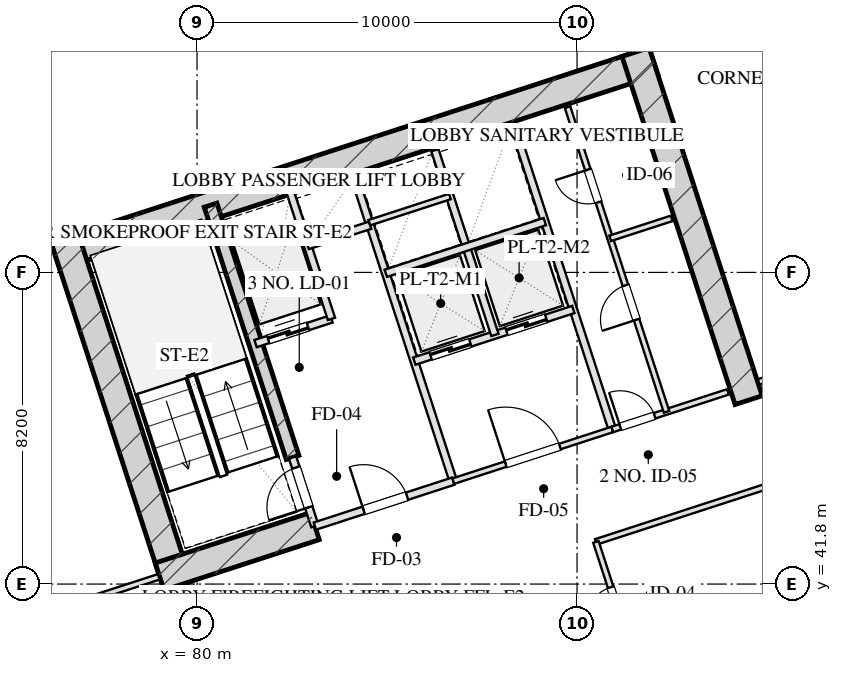
"""IFC4 building model, lengths in metres.
Left out: names, types, materials, properties, quantities, classifications, styles, units other than length and angle.
Written with IfcOpenShell. Run it as: python <this file> out.ifc"""

import sys

from ifc_helpers import new_model, si_unit, direction, frame, frame_2d, origin, place, context, subcontext, project, spatial, rectangle, extrude, element, fill, save


model = new_model("IFC4")
c1 = context("Model", 3, precision=1e-05, world=origin(), true_north=direction((0.0, 1.0)))
c2 = subcontext(c1, "Body", "Model", "MODEL_VIEW")
j1 = project(units=[si_unit("LENGTHUNIT", "METRE"), si_unit("PLANEANGLEUNIT", "RADIAN")], contexts=[c1])
p1 = place(None, origin())
s1 = spatial("IfcSite", under=j1, at=p1, CompositionType="ELEMENT")
p2 = place(p1, origin())
s2 = spatial("IfcBuilding", under=s1, at=p2, CompositionType="ELEMENT")
p3 = place(p2, frame((0.0, 0.0, 71.3)))
s3 = spatial("IfcBuildingStorey", under=s2, at=p3, CompositionType="ELEMENT", Elevation=71.3)
p4 = place(p3, frame((76.272, 50.443, 0.0), z_axis=(0.0, 0.0, 1.0), x_axis=(0.951056072937, 0.309018358888, 0.0)))
e1 = element("IfcWall", 1, at=p4, inside=s3, PredefinedType="SHEAR", context=c2, shape_type="SweptSolid", body=[
    extrude(rectangle(XDim=16.55, YDim=0.75, at=frame_2d((8.275, 0.0))), origin(), (0.0, 0.0, 1.0), 3.45),
])
for number, where, z_axis, x_axis in (
    (2, (79.489, 41.756, 0.0), (0.0, 0.0, 1.0), (-0.309, 0.951, 0.0)),
    (3, (94.515, 46.639, 0.0), (0.0, 0.0, 1.0), (-0.309, 0.951, 0.0)),
):
    element("IfcWall", number, at=place(p3, frame(where, z_axis=z_axis, x_axis=x_axis)), inside=s3, PredefinedType="SHEAR", context=c2, shape_type="SweptSolid", body=[
        extrude(rectangle(XDim=9.63, YDim=0.75, at=frame_2d((4.815, 0.0))), origin(), (0.0, 0.0, 1.0), 3.45),
    ])
p5 = place(p3, frame((82.514, 45.131, 0.0), z_axis=(0.0, 0.0, 1.0), x_axis=(-0.308988790936, 0.951065679686, 0.0)))
e4 = element("IfcWall", 4, at=p5, inside=s3, PredefinedType="SHEAR", context=c2, shape_type="SweptSolid", body=[
    extrude(rectangle(XDim=6.98, YDim=0.35, at=frame_2d((3.49, 0.0))), origin(), (0.0, 0.0, 1.0), 3.45),
])
p6 = place(p3, frame((79.016, 41.997, 0.0), z_axis=(0.0, 0.0, 1.0), x_axis=(0.95106038264, 0.309005094736, 0.0)))
e5 = element("IfcWall", 5, at=p6, inside=s3, PredefinedType="SHEAR", context=c2, shape_type="SweptSolid", body=[
    extrude(rectangle(XDim=4.295, YDim=0.75, at=frame_2d((2.147, 0.0))), origin(), (0.0, 0.0, 1.0), 3.45),
])
p7 = place(p3, frame((79.655, 4.352, 0.0), z_axis=(0.0, 0.0, 1.0), x_axis=(-0.309014526607, 0.951057318118, 0.0)))
e6 = element("IfcWall", 6, at=p7, inside=s3, PredefinedType="SOLIDWALL", context=c2, shape_type="SweptSolid", body=[
    extrude(rectangle(XDim=50.0, YDim=0.4, at=frame_2d((25.0, 0.0))), origin(), (0.0, 0.0, 1.0), 2.61),
])
p8 = place(p7, frame((17.35, 0.0, 0.75)))
e7 = element("IfcOpeningElement", 7, at=p8, cuts=e6, PredefinedType="OPENING", context=c2, shape_type="SweptSolid", body=[
    extrude(rectangle(XDim=2.5, YDim=1.46, at=frame_2d((1.25, 0.73))), frame((0.0, 0.21, 0.0), z_axis=(0.0, -1.0, 0.0), x_axis=(1.0, 0.0, 0.0)), (0.0, 0.0, 1.0), 0.42),
])
p9 = place(p7, frame((30.25, 0.0, 0.0)))
e8 = element("IfcOpeningElement", 8, at=p9, cuts=e6, PredefinedType="OPENING", context=c2, shape_type="SweptSolid", body=[
    extrude(rectangle(XDim=1.1, YDim=2.15, at=frame_2d((0.55, 1.075))), frame((0.0, 0.21, 0.0), z_axis=(0.0, -1.0, 0.0), x_axis=(1.0, 0.0, 0.0)), (0.0, 0.0, 1.0), 0.42),
])
p10 = place(p3, frame((66.002, 55.433, 0.0), z_axis=(0.0, 0.0, 1.0), x_axis=(0.951055939317, 0.309018770125, 0.0)))
e9 = element("IfcWall", 9, at=p10, inside=s3, PredefinedType="SOLIDWALL", context=c2, shape_type="SweptSolid", body=[
    extrude(rectangle(XDim=32.4, YDim=0.4, at=frame_2d((16.2, 0.0))), origin(), (0.0, 0.0, 1.0), 2.61),
])
p11 = place(p3, frame((83.101, 43.324, 0.0), z_axis=(0.0, 0.0, 1.0), x_axis=(-0.309048298632, 0.951046344356, 0.0)))
e10 = element("IfcWall", 10, at=p11, inside=s3, PredefinedType="PARTITIONING", context=c2, shape_type="SweptSolid", body=[
    extrude(rectangle(XDim=1.9, YDim=0.2, at=frame_2d((0.95, 0.0))), origin(), (0.0, 0.0, 1.0), 3.175),
])
p12 = place(p11, frame((0.52, 0.0, 0.0)))
e11 = element("IfcOpeningElement", 11, at=p12, cuts=e10, PredefinedType="OPENING", context=c2, shape_type="SweptSolid", body=[
    extrude(rectangle(XDim=1.1, YDim=2.05, at=frame_2d((0.55, 1.025))), frame((0.0, 0.11, 0.0), z_axis=(0.0, -1.0, 0.0), x_axis=(1.0, 0.0, 0.0)), (0.0, 0.0, 1.0), 0.22),
])
p13 = place(p3, frame((86.743, 44.508, 0.0), z_axis=(0.0, 0.0, 1.0), x_axis=(-0.309016001439, 0.951056838919, 0.0)))
e12 = element("IfcWall", 12, at=p13, inside=s3, PredefinedType="PARTITIONING", context=c2, shape_type="SweptSolid", body=[
    extrude(rectangle(XDim=8.43, YDim=0.2, at=frame_2d((4.215, 0.0))), origin(), (0.0, 0.0, 1.0), 3.175),
])
p14 = place(p3, frame((83.101, 43.324, 0.0), z_axis=(0.0, 0.0, 1.0), x_axis=(0.951052804469, 0.309028417967, 0.0)))
e13 = element("IfcWall", 13, at=p14, inside=s3, PredefinedType="PARTITIONING", context=c2, shape_type="SweptSolid", body=[
    extrude(rectangle(XDim=3.83, YDim=0.2, at=frame_2d((1.915, 0.0))), origin(), (0.0, 0.0, 1.0), 3.175),
])
p15 = place(p14, frame((1.35, 0.0, 0.0)))
e14 = element("IfcOpeningElement", 14, at=p15, cuts=e13, PredefinedType="OPENING", context=c2, shape_type="SweptSolid", body=[
    extrude(rectangle(XDim=1.2, YDim=2.05, at=frame_2d((0.6, 1.025))), frame((0.0, 0.11, 0.0), z_axis=(0.0, -1.0, 0.0), x_axis=(1.0, 0.0, 0.0)), (0.0, 0.0, 1.0), 0.22),
])
p16 = place(p3, frame((81.54, 48.127, 0.0), z_axis=(0.0, 0.0, 1.0), x_axis=(0.951062257173, 0.308999325213, 0.0)))
e15 = element("IfcWall", 15, at=p16, inside=s3, PredefinedType="PARTITIONING", context=c2, shape_type="SweptSolid", body=[
    extrude(rectangle(XDim=2.1, YDim=0.2, at=frame_2d((1.05, 0.0))), origin(), (0.0, 0.0, 1.0), 3.175),
])
p17 = place(p16, frame((0.35, 0.0, 0.0)))
e16 = element("IfcOpeningElement", 16, at=p17, cuts=e15, PredefinedType="OPENING", context=c2, shape_type="SweptSolid", body=[
    extrude(rectangle(XDim=1.1, YDim=2.05, at=frame_2d((0.55, 1.025))), frame((0.0, 0.11, 0.0), z_axis=(0.0, -1.0, 0.0), x_axis=(1.0, 0.0, 0.0)), (0.0, 0.0, 1.0), 0.22),
])
p18 = place(p3, frame((83.538, 48.776, 0.0), z_axis=(0.0, 0.0, 1.0), x_axis=(-0.3089935693, 0.951064127245, 0.0)))
e17 = element("IfcWall", 17, at=p18, inside=s3, PredefinedType="PARTITIONING", context=c2, shape_type="SweptSolid", body=[
    extrude(rectangle(XDim=3.7, YDim=0.2, at=frame_2d((1.85, 0.0))), origin(), (0.0, 0.0, 1.0), 3.175),
])
p19 = place(p3, frame((82.91, 50.707, 0.0), z_axis=(0.0, 0.0, 1.0), x_axis=(0.951041328149, 0.309063734775, 0.0)))
e18 = element("IfcWall", 18, at=p19, inside=s3, PredefinedType="PARTITIONING", context=c2, shape_type="SweptSolid", body=[
    extrude(rectangle(XDim=1.73, YDim=0.2, at=frame_2d((0.865, 0.0))), origin(), (0.0, 0.0, 1.0), 3.175),
])
p20 = place(p3, frame((90.928, 45.868, 0.0), z_axis=(0.0, 0.0, 1.0), x_axis=(-0.309042196757, 0.951048327176, 0.0)))
e19 = element("IfcWall", 19, at=p20, inside=s3, PredefinedType="PARTITIONING", context=c2, shape_type="SweptSolid", body=[
    extrude(rectangle(XDim=8.43, YDim=0.2, at=frame_2d((4.215, 0.0))), origin(), (0.0, 0.0, 1.0), 3.175),
])
p21 = place(p3, frame((86.743, 44.508, 0.0), z_axis=(0.0, 0.0, 1.0), x_axis=(0.951063829732, 0.308994485023, 0.0)))
e20 = element("IfcWall", 20, at=p21, inside=s3, PredefinedType="PARTITIONING", context=c2, shape_type="SweptSolid", body=[
    extrude(rectangle(XDim=4.4, YDim=0.15, at=frame_2d((2.2, 0.0))), origin(), (0.0, 0.0, 1.0), 3.175),
])
p22 = place(p21, frame((1.45, 0.0, 0.0)))
e21 = element("IfcOpeningElement", 21, at=p22, cuts=e20, PredefinedType="OPENING", context=c2, shape_type="SweptSolid", body=[
    extrude(rectangle(XDim=1.5, YDim=2.05, at=frame_2d((0.75, 1.025))), frame((0.0, 0.085, 0.0), z_axis=(0.0, -1.0, 0.0), x_axis=(1.0, 0.0, 0.0)), (0.0, 0.0, 1.0), 0.17),
])
p23 = place(p3, frame((85.718, 47.666, 0.0), z_axis=(0.0, 0.0, 1.0), x_axis=(0.951058531764, 0.30901079133, 0.0)))
e22 = element("IfcWall", 22, at=p23, inside=s3, PredefinedType="PARTITIONING", context=c2, shape_type="SweptSolid", body=[
    extrude(rectangle(XDim=4.4, YDim=0.2, at=frame_2d((2.2, 0.0))), origin(), (0.0, 0.0, 1.0), 3.175),
])
p24 = place(p23, frame((0.45, 0.0, 0.0)))
e23 = element("IfcOpeningElement", 23, at=p24, cuts=e22, PredefinedType="OPENING", context=c2, shape_type="SweptSolid", body=[
    extrude(rectangle(XDim=1.1, YDim=2.05, at=frame_2d((0.55, 1.025))), frame((0.0, 0.11, 0.0), z_axis=(0.0, -1.0, 0.0), x_axis=(1.0, 0.0, 0.0)), (0.0, 0.0, 1.0), 0.22),
])
p25 = place(p23, frame((2.55, 0.0, 0.0)))
e24 = element("IfcOpeningElement", 24, at=p25, cuts=e22, PredefinedType="OPENING", context=c2, shape_type="SweptSolid", body=[
    extrude(rectangle(XDim=1.1, YDim=2.05, at=frame_2d((0.55, 1.025))), frame((0.0, 0.11, 0.0), z_axis=(0.0, -1.0, 0.0), x_axis=(1.0, 0.0, 0.0)), (0.0, 0.0, 1.0), 0.22),
])
p26 = place(p3, frame((87.838, 48.354, 0.0), z_axis=(0.0, 0.0, 1.0), x_axis=(-0.3090093719, 0.951058992953, 0.0)))
e25 = element("IfcWall", 25, at=p26, inside=s3, PredefinedType="PARTITIONING", context=c2, shape_type="SweptSolid", body=[
    extrude(rectangle(XDim=5.11, YDim=0.2, at=frame_2d((2.555, 0.0))), origin(), (0.0, 0.0, 1.0), 3.175),
])
p27 = place(p3, frame((84.967, 49.977, 0.0), z_axis=(0.0, 0.0, 1.0), x_axis=(0.951063829732, 0.308994485023, 0.0)))
e26 = element("IfcWall", 26, at=p27, inside=s3, PredefinedType="PARTITIONING", context=c2, shape_type="SweptSolid", body=[
    extrude(rectangle(XDim=4.4, YDim=0.2, at=frame_2d((2.2, 0.0))), origin(), (0.0, 0.0, 1.0), 3.175),
])
p28 = place(p3, frame((84.534, 51.308, 0.0), z_axis=(0.0, 0.0, 1.0), x_axis=(0.951075093106, 0.308959814982, 0.0)))
e27 = element("IfcWall", 27, at=p28, inside=s3, PredefinedType="PARTITIONING", context=c2, shape_type="SweptSolid", body=[
    extrude(rectangle(XDim=2.23, YDim=0.15, at=frame_2d((1.115, 0.0))), origin(), (0.0, 0.0, 1.0), 3.175),
])
p29 = place(p3, frame((90.928, 45.868, 0.0), z_axis=(0.0, 0.0, 1.0), x_axis=(0.951059297078, 0.309008435874, 0.0)))
e28 = element("IfcWall", 28, at=p29, inside=s3, PredefinedType="PARTITIONING", context=c2, shape_type="SweptSolid", body=[
    extrude(rectangle(XDim=3.2, YDim=0.15, at=frame_2d((1.6, 0.0))), origin(), (0.0, 0.0, 1.0), 3.175),
])
p30 = place(p29, frame((0.22, 0.0, 0.0)))
e29 = element("IfcOpeningElement", 29, at=p30, cuts=e28, PredefinedType="OPENING", context=c2, shape_type="SweptSolid", body=[
    extrude(rectangle(XDim=0.95, YDim=2.05, at=frame_2d((0.475, 1.025))), frame((0.0, 0.085, 0.0), z_axis=(0.0, -1.0, 0.0), x_axis=(1.0, 0.0, 0.0)), (0.0, 0.0, 1.0), 0.17),
])
p31 = place(p3, frame((92.355, 46.331, 0.0), z_axis=(0.0, 0.0, 1.0), x_axis=(-0.309007490203, 0.951059604335, 0.0)))
e30 = element("IfcWall", 30, at=p31, inside=s3, PredefinedType="PARTITIONING", context=c2, shape_type="SweptSolid", body=[
    extrude(rectangle(XDim=8.43, YDim=0.15, at=frame_2d((4.215, 0.0))), origin(), (0.0, 0.0, 1.0), 3.175),
])
p32 = place(p31, frame((2.55, 0.0, 0.0)))
e31 = element("IfcOpeningElement", 31, at=p32, cuts=e30, PredefinedType="OPENING", context=c2, shape_type="SweptSolid", body=[
    extrude(rectangle(XDim=0.95, YDim=2.05, at=frame_2d((0.475, 1.025))), frame((0.0, 0.085, 0.0), z_axis=(0.0, -1.0, 0.0), x_axis=(1.0, 0.0, 0.0)), (0.0, 0.0, 1.0), 0.17),
])
p33 = place(p31, frame((5.8, 0.0, 0.0)))
e32 = element("IfcOpeningElement", 32, at=p33, cuts=e30, PredefinedType="OPENING", context=c2, shape_type="SweptSolid", body=[
    extrude(rectangle(XDim=0.9, YDim=2.05, at=frame_2d((0.45, 1.025))), frame((0.0, 0.085, 0.0), z_axis=(0.0, -1.0, 0.0), x_axis=(1.0, 0.0, 0.0)), (0.0, 0.0, 1.0), 0.17),
])
p34 = place(p3, frame((90.871, 50.896, 0.0), z_axis=(0.0, 0.0, 1.0), x_axis=(0.951054116971, 0.309024378638, 0.0)))
e33 = element("IfcWall", 33, at=p34, inside=s3, PredefinedType="PARTITIONING", context=c2, shape_type="SweptSolid", body=[
    extrude(rectangle(XDim=1.7, YDim=0.15, at=frame_2d((0.85, 0.0))), origin(), (0.0, 0.0, 1.0), 3.175),
])
p35 = place(p3, frame((68.721, 38.652, 0.0), z_axis=(0.0, 0.0, 1.0), x_axis=(0.951056658866, 0.309016555588, 0.0)))
e34 = element("IfcWall", 34, at=p35, inside=s3, PredefinedType="PARTITIONING", context=c2, shape_type="SweptSolid", body=[
    extrude(rectangle(XDim=10.8, YDim=0.15, at=frame_2d((5.4, 0.0))), origin(), (0.0, 0.0, 1.0), 3.175),
])
p36 = place(p35, frame((4.536, 0.0, 0.0)))
e35 = element("IfcOpeningElement", 35, at=p36, cuts=e34, PredefinedType="OPENING", context=c2, shape_type="SweptSolid", body=[
    extrude(rectangle(XDim=1.0, YDim=2.05, at=frame_2d((0.5, 1.025))), frame((0.0, 0.085, 0.0), z_axis=(0.0, -1.0, 0.0), x_axis=(1.0, 0.0, 0.0)), (0.0, 0.0, 1.0), 0.17),
])
p37 = place(p3, frame((94.78, 47.119, 0.0), z_axis=(0.0, 0.0, 1.0), x_axis=(0.951054294345, 0.309023832749, 0.0)))
e36 = element("IfcWall", 36, at=p37, inside=s3, PredefinedType="PARTITIONING", context=c2, shape_type="SweptSolid", body=[
    extrude(rectangle(XDim=10.2, YDim=0.15, at=frame_2d((5.1, 0.0))), origin(), (0.0, 0.0, 1.0), 3.175),
])
p38 = place(p37, frame((4.284, 0.0, 0.0)))
e37 = element("IfcOpeningElement", 37, at=p38, cuts=e36, PredefinedType="OPENING", context=c2, shape_type="SweptSolid", body=[
    extrude(rectangle(XDim=0.85, YDim=2.05, at=frame_2d((0.425, 1.025))), frame((0.0, 0.085, 0.0), z_axis=(0.0, -1.0, 0.0), x_axis=(1.0, 0.0, 0.0)), (0.0, 0.0, 1.0), 0.17),
])
p39 = place(p3, frame((69.549, 36.103, 0.0), z_axis=(0.0, 0.0, 1.0), x_axis=(0.951057299418, 0.309014584159, 0.0)))
e38 = element("IfcWall", 38, at=p39, inside=s3, PredefinedType="PARTITIONING", context=c2, shape_type="SweptSolid", body=[
    extrude(rectangle(XDim=17.375, YDim=0.15, at=frame_2d((8.688, 0.0))), origin(), (0.0, 0.0, 1.0), 3.175),
])
p40 = place(p3, frame((90.496, 42.909, 0.0), z_axis=(0.0, 0.0, 1.0), x_axis=(0.951055837847, 0.309019082414, 0.0)))
e39 = element("IfcWall", 39, at=p40, inside=s3, PredefinedType="PARTITIONING", context=c2, shape_type="SweptSolid", body=[
    extrude(rectangle(XDim=15.575, YDim=0.15, at=frame_2d((7.788, 0.0))), origin(), (0.0, 0.0, 1.0), 3.175),
])
p41 = place(p3, frame((95.638, 27.084, 0.0), z_axis=(0.0, 0.0, 1.0), x_axis=(-0.30901773025, 0.951056277195, 0.0)))
e40 = element("IfcWall", 40, at=p41, inside=s3, PredefinedType="PARTITIONING", context=c2, shape_type="SweptSolid", body=[
    extrude(rectangle(XDim=16.64, YDim=0.15, at=frame_2d((8.32, 0.0))), origin(), (0.0, 0.0, 1.0), 3.175),
])
p42 = place(p41, frame((1.655, 0.0, 0.0)))
e41 = element("IfcOpeningElement", 41, at=p42, cuts=e40, PredefinedType="OPENING", context=c2, shape_type="SweptSolid", body=[
    extrude(rectangle(XDim=1.0, YDim=2.05, at=frame_2d((0.5, 1.025))), frame((0.0, 0.085, 0.0), z_axis=(0.0, -1.0, 0.0), x_axis=(1.0, 0.0, 0.0)), (0.0, 0.0, 1.0), 0.17),
])
p43 = place(p41, frame((6.155, 0.0, 0.0)))
e42 = element("IfcOpeningElement", 42, at=p43, cuts=e40, PredefinedType="OPENING", context=c2, shape_type="SweptSolid", body=[
    extrude(rectangle(XDim=1.0, YDim=2.05, at=frame_2d((0.5, 1.025))), frame((0.0, 0.085, 0.0), z_axis=(0.0, -1.0, 0.0), x_axis=(1.0, 0.0, 0.0)), (0.0, 0.0, 1.0), 0.17),
])
p44 = place(p41, frame((10.565, 0.0, 0.0)))
e43 = element("IfcOpeningElement", 43, at=p44, cuts=e40, PredefinedType="OPENING", context=c2, shape_type="SweptSolid", body=[
    extrude(rectangle(XDim=1.0, YDim=2.05, at=frame_2d((0.5, 1.025))), frame((0.0, 0.085, 0.0), z_axis=(0.0, -1.0, 0.0), x_axis=(1.0, 0.0, 0.0)), (0.0, 0.0, 1.0), 0.17),
])
p45 = place(p41, frame((14.385, 0.0, 0.0)))
e44 = element("IfcOpeningElement", 44, at=p45, cuts=e40, PredefinedType="OPENING", context=c2, shape_type="SweptSolid", body=[
    extrude(rectangle(XDim=1.0, YDim=2.05, at=frame_2d((0.5, 1.025))), frame((0.0, 0.085, 0.0), z_axis=(0.0, -1.0, 0.0), x_axis=(1.0, 0.0, 0.0)), (0.0, 0.0, 1.0), 0.17),
])
p46 = place(p3, frame((91.581, 39.57, 0.0), z_axis=(0.0, 0.0, 1.0), x_axis=(0.951055837847, 0.309019082414, 0.0)))
e45 = element("IfcWall", 45, at=p46, inside=s3, PredefinedType="PARTITIONING", context=c2, shape_type="SweptSolid", body=[
    extrude(rectangle(XDim=15.575, YDim=0.15, at=frame_2d((7.788, 0.0))), origin(), (0.0, 0.0, 1.0), 3.175),
])
p47 = place(p12, origin())
e46 = element("IfcDoor", 46, at=p47, inside=s3, OperationType="SINGLE_SWING_LEFT", PredefinedType="DOOR", context=c2, shape_type="SweptSolid", body=[
    extrude(rectangle(XDim=1.1, YDim=2.05, at=frame_2d((0.55, 1.025))), frame((0.0, 0.025, 0.0), z_axis=(0.0, -1.0, 0.0), x_axis=(1.0, 0.0, 0.0)), (0.0, 0.0, 1.0), 0.05),
])
fill(e11, e46)
p48 = place(p15, origin())
e47 = element("IfcDoor", 47, at=p48, inside=s3, OperationType="SINGLE_SWING_LEFT", PredefinedType="DOOR", context=c2, shape_type="SweptSolid", body=[
    extrude(rectangle(XDim=1.2, YDim=2.05, at=frame_2d((0.6, 1.025))), frame((0.0, 0.025, 0.0), z_axis=(0.0, -1.0, 0.0), x_axis=(1.0, 0.0, 0.0)), (0.0, 0.0, 1.0), 0.05),
])
fill(e14, e47)
p49 = place(p17, origin())
e48 = element("IfcDoor", 48, at=p49, inside=s3, OperationType="DOUBLE_DOOR_SLIDING", PredefinedType="DOOR", context=c2, shape_type="SweptSolid", body=[
    extrude(rectangle(XDim=1.1, YDim=2.05, at=frame_2d((0.55, 1.025))), frame((0.0, 0.025, 0.0), z_axis=(0.0, -1.0, 0.0), x_axis=(1.0, 0.0, 0.0)), (0.0, 0.0, 1.0), 0.05),
])
fill(e16, e48)
p50 = place(p22, origin())
e49 = element("IfcDoor", 49, at=p50, inside=s3, OperationType="SINGLE_SWING_LEFT", PredefinedType="DOOR", context=c2, shape_type="SweptSolid", body=[
    extrude(rectangle(XDim=1.5, YDim=2.05, at=frame_2d((0.75, 1.025))), frame((0.0, 0.025, 0.0), z_axis=(0.0, -1.0, 0.0), x_axis=(1.0, 0.0, 0.0)), (0.0, 0.0, 1.0), 0.05),
])
fill(e21, e49)
p51 = place(p24, origin())
e50 = element("IfcDoor", 50, at=p51, inside=s3, OperationType="DOUBLE_DOOR_SLIDING", PredefinedType="DOOR", context=c2, shape_type="SweptSolid", body=[
    extrude(rectangle(XDim=1.1, YDim=2.05, at=frame_2d((0.55, 1.025))), frame((0.0, 0.025, 0.0), z_axis=(0.0, -1.0, 0.0), x_axis=(1.0, 0.0, 0.0)), (0.0, 0.0, 1.0), 0.05),
])
fill(e23, e50)
p52 = place(p25, origin())
e51 = element("IfcDoor", 51, at=p52, inside=s3, OperationType="DOUBLE_DOOR_SLIDING", PredefinedType="DOOR", context=c2, shape_type="SweptSolid", body=[
    extrude(rectangle(XDim=1.1, YDim=2.05, at=frame_2d((0.55, 1.025))), frame((0.0, 0.025, 0.0), z_axis=(0.0, -1.0, 0.0), x_axis=(1.0, 0.0, 0.0)), (0.0, 0.0, 1.0), 0.05),
])
fill(e24, e51)
p53 = place(p30, origin())
e52 = element("IfcDoor", 52, at=p53, inside=s3, OperationType="SINGLE_SWING_LEFT", PredefinedType="DOOR", context=c2, shape_type="SweptSolid", body=[
    extrude(rectangle(XDim=0.95, YDim=2.05, at=frame_2d((0.475, 1.025))), frame((0.0, 0.025, 0.0), z_axis=(0.0, -1.0, 0.0), x_axis=(1.0, 0.0, 0.0)), (0.0, 0.0, 1.0), 0.05),
])
fill(e29, e52)
p54 = place(p32, origin())
e53 = element("IfcDoor", 53, at=p54, inside=s3, OperationType="SINGLE_SWING_LEFT", PredefinedType="DOOR", context=c2, shape_type="SweptSolid", body=[
    extrude(rectangle(XDim=0.95, YDim=2.05, at=frame_2d((0.475, 1.025))), frame((0.0, 0.025, 0.0), z_axis=(0.0, -1.0, 0.0), x_axis=(1.0, 0.0, 0.0)), (0.0, 0.0, 1.0), 0.05),
])
fill(e31, e53)
p55 = place(p33, origin())
e54 = element("IfcDoor", 54, at=p55, inside=s3, OperationType="SINGLE_SWING_RIGHT", PredefinedType="DOOR", context=c2, shape_type="SweptSolid", body=[
    extrude(rectangle(XDim=0.9, YDim=2.05, at=frame_2d((0.45, 1.025))), frame((0.0, 0.025, 0.0), z_axis=(0.0, -1.0, 0.0), x_axis=(1.0, 0.0, 0.0)), (0.0, 0.0, 1.0), 0.05),
])
fill(e32, e54)
p56 = place(p45, origin())
e55 = element("IfcDoor", 55, at=p56, inside=s3, OperationType="SINGLE_SWING_LEFT", PredefinedType="DOOR", context=c2, shape_type="SweptSolid", body=[
    extrude(rectangle(XDim=1.0, YDim=2.05, at=frame_2d((0.5, 1.025))), frame((0.0, 0.025, 0.0), z_axis=(0.0, -1.0, 0.0), x_axis=(1.0, 0.0, 0.0)), (0.0, 0.0, 1.0), 0.05),
])
fill(e44, e55)
save(model, sys.argv[1])
